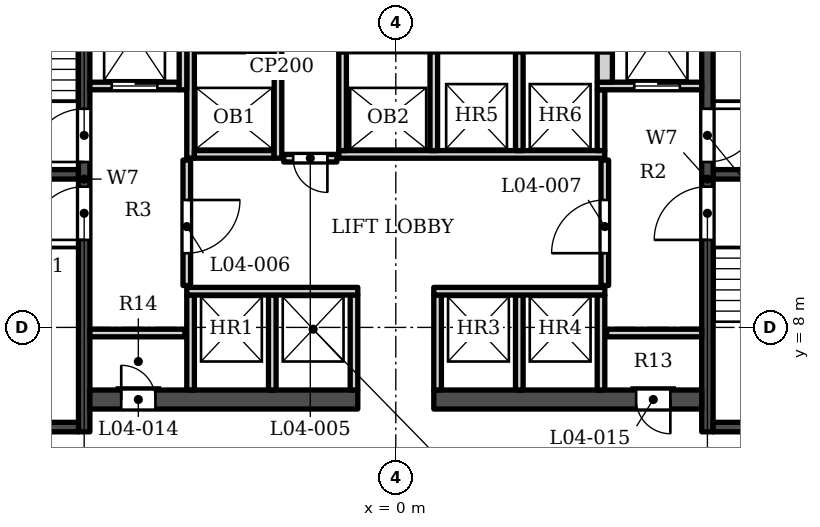
"""IFC4 building model, lengths in metres.
Left out: names, types, materials, properties, quantities, classifications, styles, units other than length and angle.
Written with IfcOpenShell. Run it as: python <this file> out.ifc"""

import sys

from ifc_helpers import new_model, si_unit, direction, frame, frame_2d, origin, place, context, subcontext, project, spatial, rectangle, extrude, element, fill, save


model = new_model("IFC4")
c1 = context("Model", 3, precision=1e-05, world=origin(), true_north=direction((0.0, 1.0)))
c2 = subcontext(c1, "Body", "Model", "MODEL_VIEW")
j1 = project(units=[si_unit("LENGTHUNIT", "METRE"), si_unit("PLANEANGLEUNIT", "RADIAN")], contexts=[c1])
p1 = place(None, origin())
s1 = spatial("IfcSite", under=j1, at=p1, CompositionType="ELEMENT")
p2 = place(p1, origin())
s2 = spatial("IfcBuilding", under=s1, at=p2, CompositionType="ELEMENT")
p3 = place(p2, frame((0.0, 0.0, 34.5)))
s3 = spatial("IfcBuildingStorey", under=s2, at=p3, CompositionType="ELEMENT", Elevation=34.5)
p4 = place(p3, frame((-8.2, 5.253, 0.0), z_axis=(0.0, 0.0, 1.0), x_axis=(0.0, 1.0, 0.0)))
e1 = element("IfcWall", 1, at=p4, inside=s3, PredefinedType="SHEAR", context=c2, shape_type="SweptSolid", body=[
    extrude(rectangle(XDim=13.3, YDim=0.3, at=frame_2d((6.65, 0.0))), origin(), (0.0, 0.0, 1.0), 5.5),
])
p5 = place(p4, frame((7.1, 0.0, 0.0)))
e2 = element("IfcOpeningElement", 2, at=p5, cuts=e1, PredefinedType="OPENING", context=c2, shape_type="SweptSolid", body=[
    extrude(rectangle(XDim=1.4, YDim=2.1, at=frame_2d((0.7, 1.05))), frame((0.0, 0.16, 0.0), z_axis=(0.0, -1.0, 0.0), x_axis=(1.0, 0.0, 0.0)), (0.0, 0.0, 1.0), 0.32),
])
p6 = place(p4, frame((5.05, 0.0, 0.0)))
e3 = element("IfcOpeningElement", 3, at=p6, cuts=e1, PredefinedType="OPENING", context=c2, shape_type="SweptSolid", body=[
    extrude(rectangle(XDim=1.4, YDim=2.1, at=frame_2d((0.7, 1.05))), frame((0.0, 0.16, 0.0), z_axis=(0.0, -1.0, 0.0), x_axis=(1.0, 0.0, 0.0)), (0.0, 0.0, 1.0), 0.32),
])
for number, where, z_axis, x_axis in (
    (4, (-12.1, 12.028, 0.0), (0.0, 0.0, 1.0), (1.0, 0.0, 0.0)),
    (5, (-12.1, 5.378, 0.0), (0.0, 0.0, 1.0), (1.0, 0.0, 0.0)),
):
    element("IfcWall", number, at=place(p3, frame(where, z_axis=z_axis, x_axis=x_axis)), inside=s3, PredefinedType="SHEAR", context=c2, shape_type="SweptSolid", body=[
        extrude(rectangle(XDim=3.75, YDim=0.25, at=frame_2d((1.875, 0.0))), origin(), (0.0, 0.0, 1.0), 5.5),
    ])
p7 = place(p3, frame((8.2, 5.253, 0.0), z_axis=(0.0, 0.0, 1.0), x_axis=(0.0, 1.0, 0.0)))
e6 = element("IfcWall", 6, at=p7, inside=s3, PredefinedType="SHEAR", context=c2, shape_type="SweptSolid", body=[
    extrude(rectangle(XDim=13.3, YDim=0.3, at=frame_2d((6.65, 0.0))), origin(), (0.0, 0.0, 1.0), 5.5),
])
p8 = place(p7, frame((7.1, 0.0, 0.0)))
e7 = element("IfcOpeningElement", 7, at=p8, cuts=e6, PredefinedType="OPENING", context=c2, shape_type="SweptSolid", body=[
    extrude(rectangle(XDim=1.4, YDim=2.1, at=frame_2d((0.7, 1.05))), frame((0.0, 0.16, 0.0), z_axis=(0.0, -1.0, 0.0), x_axis=(1.0, 0.0, 0.0)), (0.0, 0.0, 1.0), 0.32),
])
p9 = place(p7, frame((5.05, 0.0, 0.0)))
e8 = element("IfcOpeningElement", 8, at=p9, cuts=e6, PredefinedType="OPENING", context=c2, shape_type="SweptSolid", body=[
    extrude(rectangle(XDim=1.4, YDim=2.1, at=frame_2d((0.7, 1.05))), frame((0.0, 0.16, 0.0), z_axis=(0.0, -1.0, 0.0), x_axis=(1.0, 0.0, 0.0)), (0.0, 0.0, 1.0), 0.32),
])
for number, where, z_axis, x_axis in (
    (9, (8.35, 12.028, 0.0), (0.0, 0.0, 1.0), (1.0, 0.0, 0.0)),
    (10, (8.35, 5.378, 0.0), (0.0, 0.0, 1.0), (1.0, 0.0, 0.0)),
):
    element("IfcWall", number, at=place(p3, frame(where, z_axis=z_axis, x_axis=x_axis)), inside=s3, PredefinedType="SHEAR", context=c2, shape_type="SweptSolid", body=[
        extrude(rectangle(XDim=3.75, YDim=0.25, at=frame_2d((1.875, 0.0))), origin(), (0.0, 0.0, 1.0), 5.5),
    ])
p10 = place(p3, frame((-8.05, 6.103, 0.0), z_axis=(0.0, 0.0, 1.0), x_axis=(1.0, 0.0, 0.0)))
e11 = element("IfcWall", 11, at=p10, inside=s3, PredefinedType="SHEAR", context=c2, shape_type="SweptSolid", body=[
    extrude(rectangle(XDim=7.05, YDim=0.5, at=frame_2d((3.525, 0.0))), origin(), (0.0, 0.0, 1.0), 5.5),
])
p11 = place(p10, frame((0.825, 0.0, 0.0)))
e12 = element("IfcOpeningElement", 12, at=p11, cuts=e11, PredefinedType="OPENING", context=c2, shape_type="SweptSolid", body=[
    extrude(rectangle(XDim=0.9, YDim=2.1, at=frame_2d((0.45, 1.05))), frame((0.0, 0.26, 0.0), z_axis=(0.0, -1.0, 0.0), x_axis=(1.0, 0.0, 0.0)), (0.0, 0.0, 1.0), 0.52),
])
p12 = place(p3, frame((1.0, 6.103, 0.0), z_axis=(0.0, 0.0, 1.0), x_axis=(1.0, 0.0, 0.0)))
e13 = element("IfcWall", 13, at=p12, inside=s3, PredefinedType="SHEAR", context=c2, shape_type="SweptSolid", body=[
    extrude(rectangle(XDim=7.05, YDim=0.5, at=frame_2d((3.525, 0.0))), origin(), (0.0, 0.0, 1.0), 5.5),
])
p13 = place(p12, frame((5.325, 0.0, 0.0)))
e14 = element("IfcOpeningElement", 14, at=p13, cuts=e13, PredefinedType="OPENING", context=c2, shape_type="SweptSolid", body=[
    extrude(rectangle(XDim=0.9, YDim=2.1, at=frame_2d((0.45, 1.05))), frame((0.0, 0.26, 0.0), z_axis=(0.0, -1.0, 0.0), x_axis=(1.0, 0.0, 0.0)), (0.0, 0.0, 1.0), 0.52),
])
for number, where, z_axis, x_axis in (
    (15, (-5.4, 6.353, 0.0), (0.0, 0.0, 1.0), (0.0, 1.0, 0.0)),
    (16, (-3.25, 6.353, 0.0), (0.0, 0.0, 1.0), (0.0, 1.0, 0.0)),
    (17, (-1.1, 6.353, 0.0), (0.0, 0.0, 1.0), (0.0, 1.0, 0.0)),
    (18, (1.1, 6.353, 0.0), (0.0, 0.0, 1.0), (0.0, 1.0, 0.0)),
    (19, (3.25, 6.353, 0.0), (0.0, 0.0, 1.0), (0.0, 1.0, 0.0)),
    (20, (5.4, 6.353, 0.0), (0.0, 0.0, 1.0), (0.0, 1.0, 0.0)),
    (21, (-8.05, 7.853, 0.0), (0.0, 0.0, 1.0), (1.0, 0.0, 0.0)),
    (22, (5.55, 7.853, 0.0), (0.0, 0.0, 1.0), (1.0, 0.0, 0.0)),
):
    element("IfcWall", number, at=place(p3, frame(where, z_axis=z_axis, x_axis=x_axis)), inside=s3, PredefinedType="SOLIDWALL", context=c2, shape_type="SweptSolid", body=[
        extrude(rectangle(XDim=2.5, YDim=0.2, at=frame_2d((1.25, 0.0))), origin(), (0.0, 0.0, 1.0), 5.05),
    ])
for number, where, z_axis, x_axis in (
    (23, (-5.5, 8.953, 0.0), (0.0, 0.0, 1.0), (1.0, 0.0, 0.0)),
    (24, (1.0, 8.953, 0.0), (0.0, 0.0, 1.0), (1.0, 0.0, 0.0)),
):
    element("IfcWall", number, at=place(p3, frame(where, z_axis=z_axis, x_axis=x_axis)), inside=s3, PredefinedType="SOLIDWALL", context=c2, shape_type="SweptSolid", body=[
        extrude(rectangle(XDim=4.5, YDim=0.2, at=frame_2d((2.25, 0.0))), origin(), (0.0, 0.0, 1.0), 5.05),
    ])
p14 = place(p3, frame((-5.5, 9.103, 0.0), z_axis=(0.0, 0.0, 1.0), x_axis=(0.0, 1.0, 0.0)))
e25 = element("IfcWall", 25, at=p14, inside=s3, PredefinedType="SOLIDWALL", context=c2, shape_type="SweptSolid", body=[
    extrude(rectangle(XDim=3.3, YDim=0.2, at=frame_2d((1.65, 0.0))), origin(), (0.0, 0.0, 1.0), 5.05),
])
p15 = place(p14, frame((0.85, 0.0, 0.0)))
e26 = element("IfcOpeningElement", 26, at=p15, cuts=e25, PredefinedType="OPENING", context=c2, shape_type="SweptSolid", body=[
    extrude(rectangle(XDim=1.4, YDim=2.1, at=frame_2d((0.7, 1.05))), frame((0.0, 0.11, 0.0), z_axis=(0.0, -1.0, 0.0), x_axis=(1.0, 0.0, 0.0)), (0.0, 0.0, 1.0), 0.22),
])
p16 = place(p3, frame((5.5, 9.103, 0.0), z_axis=(0.0, 0.0, 1.0), x_axis=(0.0, 1.0, 0.0)))
e27 = element("IfcWall", 27, at=p16, inside=s3, PredefinedType="SOLIDWALL", context=c2, shape_type="SweptSolid", body=[
    extrude(rectangle(XDim=3.3, YDim=0.2, at=frame_2d((1.65, 0.0))), origin(), (0.0, 0.0, 1.0), 5.05),
])
p17 = place(p16, frame((0.85, 0.0, 0.0)))
e28 = element("IfcOpeningElement", 28, at=p17, cuts=e27, PredefinedType="OPENING", context=c2, shape_type="SweptSolid", body=[
    extrude(rectangle(XDim=1.4, YDim=2.1, at=frame_2d((0.7, 1.05))), frame((0.0, 0.11, 0.0), z_axis=(0.0, -1.0, 0.0), x_axis=(1.0, 0.0, 0.0)), (0.0, 0.0, 1.0), 0.22),
])
p18 = place(p3, frame((-2.95, 12.453, 0.0), z_axis=(0.0, 0.0, 1.0), x_axis=(1.0, 0.0, 0.0)))
e29 = element("IfcWall", 29, at=p18, inside=s3, PredefinedType="SOLIDWALL", context=c2, shape_type="SweptSolid", body=[
    extrude(rectangle(XDim=1.4, YDim=0.2, at=frame_2d((0.7, 0.0))), origin(), (0.0, 0.0, 1.0), 5.05),
])
p19 = place(p18, frame((0.25, 0.0, 0.0)))
e30 = element("IfcOpeningElement", 30, at=p19, cuts=e29, PredefinedType="OPENING", context=c2, shape_type="SweptSolid", body=[
    extrude(rectangle(XDim=0.9, YDim=2.1, at=frame_2d((0.45, 1.05))), frame((0.0, 0.11, 0.0), z_axis=(0.0, -1.0, 0.0), x_axis=(1.0, 0.0, 0.0)), (0.0, 0.0, 1.0), 0.22),
])
p20 = place(p3, frame((-5.4, 12.453, 0.0), z_axis=(0.0, 0.0, 1.0), x_axis=(0.0, 1.0, 0.0)))
e31 = element("IfcWall", 31, at=p20, inside=s3, PredefinedType="SOLIDWALL", context=c2, shape_type="SweptSolid", body=[
    extrude(rectangle(XDim=3.0, YDim=0.2, at=frame_2d((1.5, 0.0))), origin(), (0.0, 0.0, 1.0), 5.05),
])
p21 = place(p3, frame((-5.3, 12.552, 0.0), z_axis=(0.0, 0.0, 1.0), x_axis=(1.0, 0.0, 0.0)))
e32 = element("IfcWall", 32, at=p21, inside=s3, PredefinedType="SOLIDWALL", context=c2, shape_type="SweptSolid", body=[
    extrude(rectangle(XDim=2.1, YDim=0.2, at=frame_2d((1.05, 0.0))), origin(), (0.0, 0.0, 1.0), 5.05),
])
p22 = place(p3, frame((-3.1, 12.453, 0.0), z_axis=(0.0, 0.0, 1.0), x_axis=(0.0, 1.0, 0.0)))
e33 = element("IfcWall", 33, at=p22, inside=s3, PredefinedType="SOLIDWALL", context=c2, shape_type="SweptSolid", body=[
    extrude(rectangle(XDim=3.0, YDim=0.2, at=frame_2d((1.5, 0.0))), origin(), (0.0, 0.0, 1.0), 5.05),
])
p23 = place(p3, frame((-1.5, 12.552, 0.0), z_axis=(0.0, 0.0, 1.0), x_axis=(1.0, 0.0, 0.0)))
e34 = element("IfcWall", 34, at=p23, inside=s3, PredefinedType="SOLIDWALL", context=c2, shape_type="SweptSolid", body=[
    extrude(rectangle(XDim=7.0, YDim=0.2, at=frame_2d((3.5, 0.0))), origin(), (0.0, 0.0, 1.0), 5.05),
])
for number, where, z_axis, x_axis in (
    (35, (-1.4, 12.653, 0.0), (0.0, 0.0, 1.0), (0.0, 1.0, 0.0)),
    (36, (1.0, 12.653, 0.0), (0.0, 0.0, 1.0), (0.0, 1.0, 0.0)),
    (37, (3.25, 12.653, 0.0), (0.0, 0.0, 1.0), (0.0, 1.0, 0.0)),
):
    element("IfcWall", number, at=place(p3, frame(where, z_axis=z_axis, x_axis=x_axis)), inside=s3, PredefinedType="SOLIDWALL", context=c2, shape_type="SweptSolid", body=[
        extrude(rectangle(XDim=2.6, YDim=0.2, at=frame_2d((1.3, 0.0))), origin(), (0.0, 0.0, 1.0), 5.05),
    ])
p24 = place(p3, frame((5.4, 12.653, 0.0), z_axis=(0.0, 0.0, 1.0), x_axis=(0.0, 1.0, 0.0)))
e38 = element("IfcWall", 38, at=p24, inside=s3, PredefinedType="SOLIDWALL", context=c2, shape_type="SweptSolid", body=[
    extrude(rectangle(XDim=1.6, YDim=0.2, at=frame_2d((0.8, 0.0))), origin(), (0.0, 0.0, 1.0), 5.05),
])
p25 = place(p3, frame((-8.05, 14.353, 0.0), z_axis=(0.0, 0.0, 1.0), x_axis=(1.0, 0.0, 0.0)))
e39 = element("IfcWall", 39, at=p25, inside=s3, PredefinedType="SOLIDWALL", context=c2, shape_type="SweptSolid", body=[
    extrude(rectangle(XDim=2.35, YDim=0.2, at=frame_2d((1.175, 0.0))), origin(), (0.0, 0.0, 1.0), 5.05),
])
p26 = place(p25, frame((0.575, 0.0, 0.0)))
e40 = element("IfcOpeningElement", 40, at=p26, cuts=e39, PredefinedType="OPENING", context=c2, shape_type="SweptSolid", body=[
    extrude(rectangle(XDim=1.2, YDim=2.1, at=frame_2d((0.6, 1.05))), frame((0.0, 0.11, 0.0), z_axis=(0.0, -1.0, 0.0), x_axis=(1.0, 0.0, 0.0)), (0.0, 0.0, 1.0), 0.22),
])
p27 = place(p3, frame((-5.6, 14.253, 0.0), z_axis=(0.0, 0.0, 1.0), x_axis=(0.0, 1.0, 0.0)))
e41 = element("IfcWall", 41, at=p27, inside=s3, PredefinedType="SOLIDWALL", context=c2, shape_type="SweptSolid", body=[
    extrude(rectangle(XDim=4.3, YDim=0.2, at=frame_2d((2.15, 0.0))), origin(), (0.0, 0.0, 1.0), 5.05),
])
p28 = place(p3, frame((5.3, 14.353, 0.0), z_axis=(0.0, 0.0, 1.0), x_axis=(1.0, 0.0, 0.0)))
e42 = element("IfcWall", 42, at=p28, inside=s3, PredefinedType="SOLIDWALL", context=c2, shape_type="SweptSolid", body=[
    extrude(rectangle(XDim=2.75, YDim=0.2, at=frame_2d((1.375, 0.0))), origin(), (0.0, 0.0, 1.0), 5.05),
])
p29 = place(p28, frame((0.975, 0.0, 0.0)))
e43 = element("IfcOpeningElement", 43, at=p29, cuts=e42, PredefinedType="OPENING", context=c2, shape_type="SweptSolid", body=[
    extrude(rectangle(XDim=1.2, YDim=2.1, at=frame_2d((0.6, 1.05))), frame((0.0, 0.11, 0.0), z_axis=(0.0, -1.0, 0.0), x_axis=(1.0, 0.0, 0.0)), (0.0, 0.0, 1.0), 0.22),
])
p30 = place(p3, frame((5.5, 14.453, 0.0), z_axis=(0.0, 0.0, 1.0), x_axis=(0.0, 1.0, 0.0)))
e44 = element("IfcWall", 44, at=p30, inside=s3, PredefinedType="SOLIDWALL", context=c2, shape_type="SweptSolid", body=[
    extrude(rectangle(XDim=0.8, YDim=0.4, at=frame_2d((0.4, 0.0))), origin(), (0.0, 0.0, 1.0), 5.05),
])
p31 = place(p3, frame((-5.3, 15.353, 0.0), z_axis=(0.0, 0.0, 1.0), x_axis=(1.0, 0.0, 0.0)))
e45 = element("IfcWall", 45, at=p31, inside=s3, PredefinedType="SOLIDWALL", context=c2, shape_type="SweptSolid", body=[
    extrude(rectangle(XDim=2.1, YDim=0.2, at=frame_2d((1.05, 0.0))), origin(), (0.0, 0.0, 1.0), 5.05),
])
p32 = place(p3, frame((-1.5, 15.353, 0.0), z_axis=(0.0, 0.0, 1.0), x_axis=(1.0, 0.0, 0.0)))
e46 = element("IfcWall", 46, at=p32, inside=s3, PredefinedType="SOLIDWALL", context=c2, shape_type="SweptSolid", body=[
    extrude(rectangle(XDim=7.2, YDim=0.2, at=frame_2d((3.6, 0.0))), origin(), (0.0, 0.0, 1.0), 5.05),
])
p33 = place(p26, origin())
e47 = element("IfcDoor", 47, at=p33, inside=s3, OperationType="DOUBLE_DOOR_SLIDING", PredefinedType="DOOR", context=c2, shape_type="SweptSolid", body=[
    extrude(rectangle(XDim=1.2, YDim=2.1, at=frame_2d((0.6, 1.05))), frame((0.0, 0.025, 0.0), z_axis=(0.0, -1.0, 0.0), x_axis=(1.0, 0.0, 0.0)), (0.0, 0.0, 1.0), 0.05),
])
fill(e40, e47)
p34 = place(p29, origin())
e48 = element("IfcDoor", 48, at=p34, inside=s3, OperationType="DOUBLE_DOOR_SLIDING", PredefinedType="DOOR", context=c2, shape_type="SweptSolid", body=[
    extrude(rectangle(XDim=1.2, YDim=2.1, at=frame_2d((0.6, 1.05))), frame((0.0, 0.025, 0.0), z_axis=(0.0, -1.0, 0.0), x_axis=(1.0, 0.0, 0.0)), (0.0, 0.0, 1.0), 0.05),
])
fill(e43, e48)
p35 = place(p5, origin())
e49 = element("IfcDoor", 49, at=p35, inside=s3, OperationType="SINGLE_SWING_LEFT", PredefinedType="DOOR", context=c2, shape_type="SweptSolid", body=[
    extrude(rectangle(XDim=1.4, YDim=2.1, at=frame_2d((0.7, 1.05))), frame((0.0, 0.025, 0.0), z_axis=(0.0, -1.0, 0.0), x_axis=(1.0, 0.0, 0.0)), (0.0, 0.0, 1.0), 0.05),
])
fill(e2, e49)
p36 = place(p6, origin())
e50 = element("IfcDoor", 50, at=p36, inside=s3, OperationType="SINGLE_SWING_LEFT", PredefinedType="DOOR", context=c2, shape_type="SweptSolid", body=[
    extrude(rectangle(XDim=1.4, YDim=2.1, at=frame_2d((0.7, 1.05))), frame((0.0, 0.025, 0.0), z_axis=(0.0, -1.0, 0.0), x_axis=(1.0, 0.0, 0.0)), (0.0, 0.0, 1.0), 0.05),
])
fill(e3, e50)
p37 = place(p8, origin())
e51 = element("IfcDoor", 51, at=p37, inside=s3, OperationType="SINGLE_SWING_RIGHT", PredefinedType="DOOR", context=c2, shape_type="SweptSolid", body=[
    extrude(rectangle(XDim=1.4, YDim=2.1, at=frame_2d((0.7, 1.05))), frame((0.0, 0.025, 0.0), z_axis=(0.0, -1.0, 0.0), x_axis=(1.0, 0.0, 0.0)), (0.0, 0.0, 1.0), 0.05),
])
fill(e7, e51)
p38 = place(p9, origin())
e52 = element("IfcDoor", 52, at=p38, inside=s3, OperationType="SINGLE_SWING_LEFT", PredefinedType="DOOR", context=c2, shape_type="SweptSolid", body=[
    extrude(rectangle(XDim=1.4, YDim=2.1, at=frame_2d((0.7, 1.05))), frame((0.0, 0.025, 0.0), z_axis=(0.0, -1.0, 0.0), x_axis=(1.0, 0.0, 0.0)), (0.0, 0.0, 1.0), 0.05),
])
fill(e8, e52)
p39 = place(p19, origin())
e53 = element("IfcDoor", 53, at=p39, inside=s3, OperationType="SINGLE_SWING_RIGHT", PredefinedType="DOOR", context=c2, shape_type="SweptSolid", body=[
    extrude(rectangle(XDim=0.9, YDim=2.1, at=frame_2d((0.45, 1.05))), frame((0.0, 0.025, 0.0), z_axis=(0.0, -1.0, 0.0), x_axis=(1.0, 0.0, 0.0)), (0.0, 0.0, 1.0), 0.05),
])
fill(e30, e53)
p40 = place(p15, origin())
e54 = element("IfcDoor", 54, at=p40, inside=s3, OperationType="SINGLE_SWING_RIGHT", PredefinedType="DOOR", context=c2, shape_type="SweptSolid", body=[
    extrude(rectangle(XDim=1.4, YDim=2.1, at=frame_2d((0.7, 1.05))), frame((0.0, 0.025, 0.0), z_axis=(0.0, -1.0, 0.0), x_axis=(1.0, 0.0, 0.0)), (0.0, 0.0, 1.0), 0.05),
])
fill(e26, e54)
p41 = place(p17, origin())
e55 = element("IfcDoor", 55, at=p41, inside=s3, OperationType="SINGLE_SWING_LEFT", PredefinedType="DOOR", context=c2, shape_type="SweptSolid", body=[
    extrude(rectangle(XDim=1.4, YDim=2.1, at=frame_2d((0.7, 1.05))), frame((0.0, 0.025, 0.0), z_axis=(0.0, -1.0, 0.0), x_axis=(1.0, 0.0, 0.0)), (0.0, 0.0, 1.0), 0.05),
])
fill(e28, e55)
p42 = place(p11, origin())
e56 = element("IfcDoor", 56, at=p42, inside=s3, OperationType="SINGLE_SWING_LEFT", PredefinedType="DOOR", context=c2, shape_type="SweptSolid", body=[
    extrude(rectangle(XDim=0.9, YDim=2.1, at=frame_2d((0.45, 1.05))), frame((0.0, 0.025, 0.0), z_axis=(0.0, -1.0, 0.0), x_axis=(1.0, 0.0, 0.0)), (0.0, 0.0, 1.0), 0.05),
])
fill(e12, e56)
p43 = place(p13, origin())
e57 = element("IfcDoor", 57, at=p43, inside=s3, OperationType="SINGLE_SWING_RIGHT", PredefinedType="DOOR", context=c2, shape_type="SweptSolid", body=[
    extrude(rectangle(XDim=0.9, YDim=2.1, at=frame_2d((0.45, 1.05))), frame((0.0, 0.025, 0.0), z_axis=(0.0, -1.0, 0.0), x_axis=(1.0, 0.0, 0.0)), (0.0, 0.0, 1.0), 0.05),
])
fill(e14, e57)
save(model, sys.argv[1])
